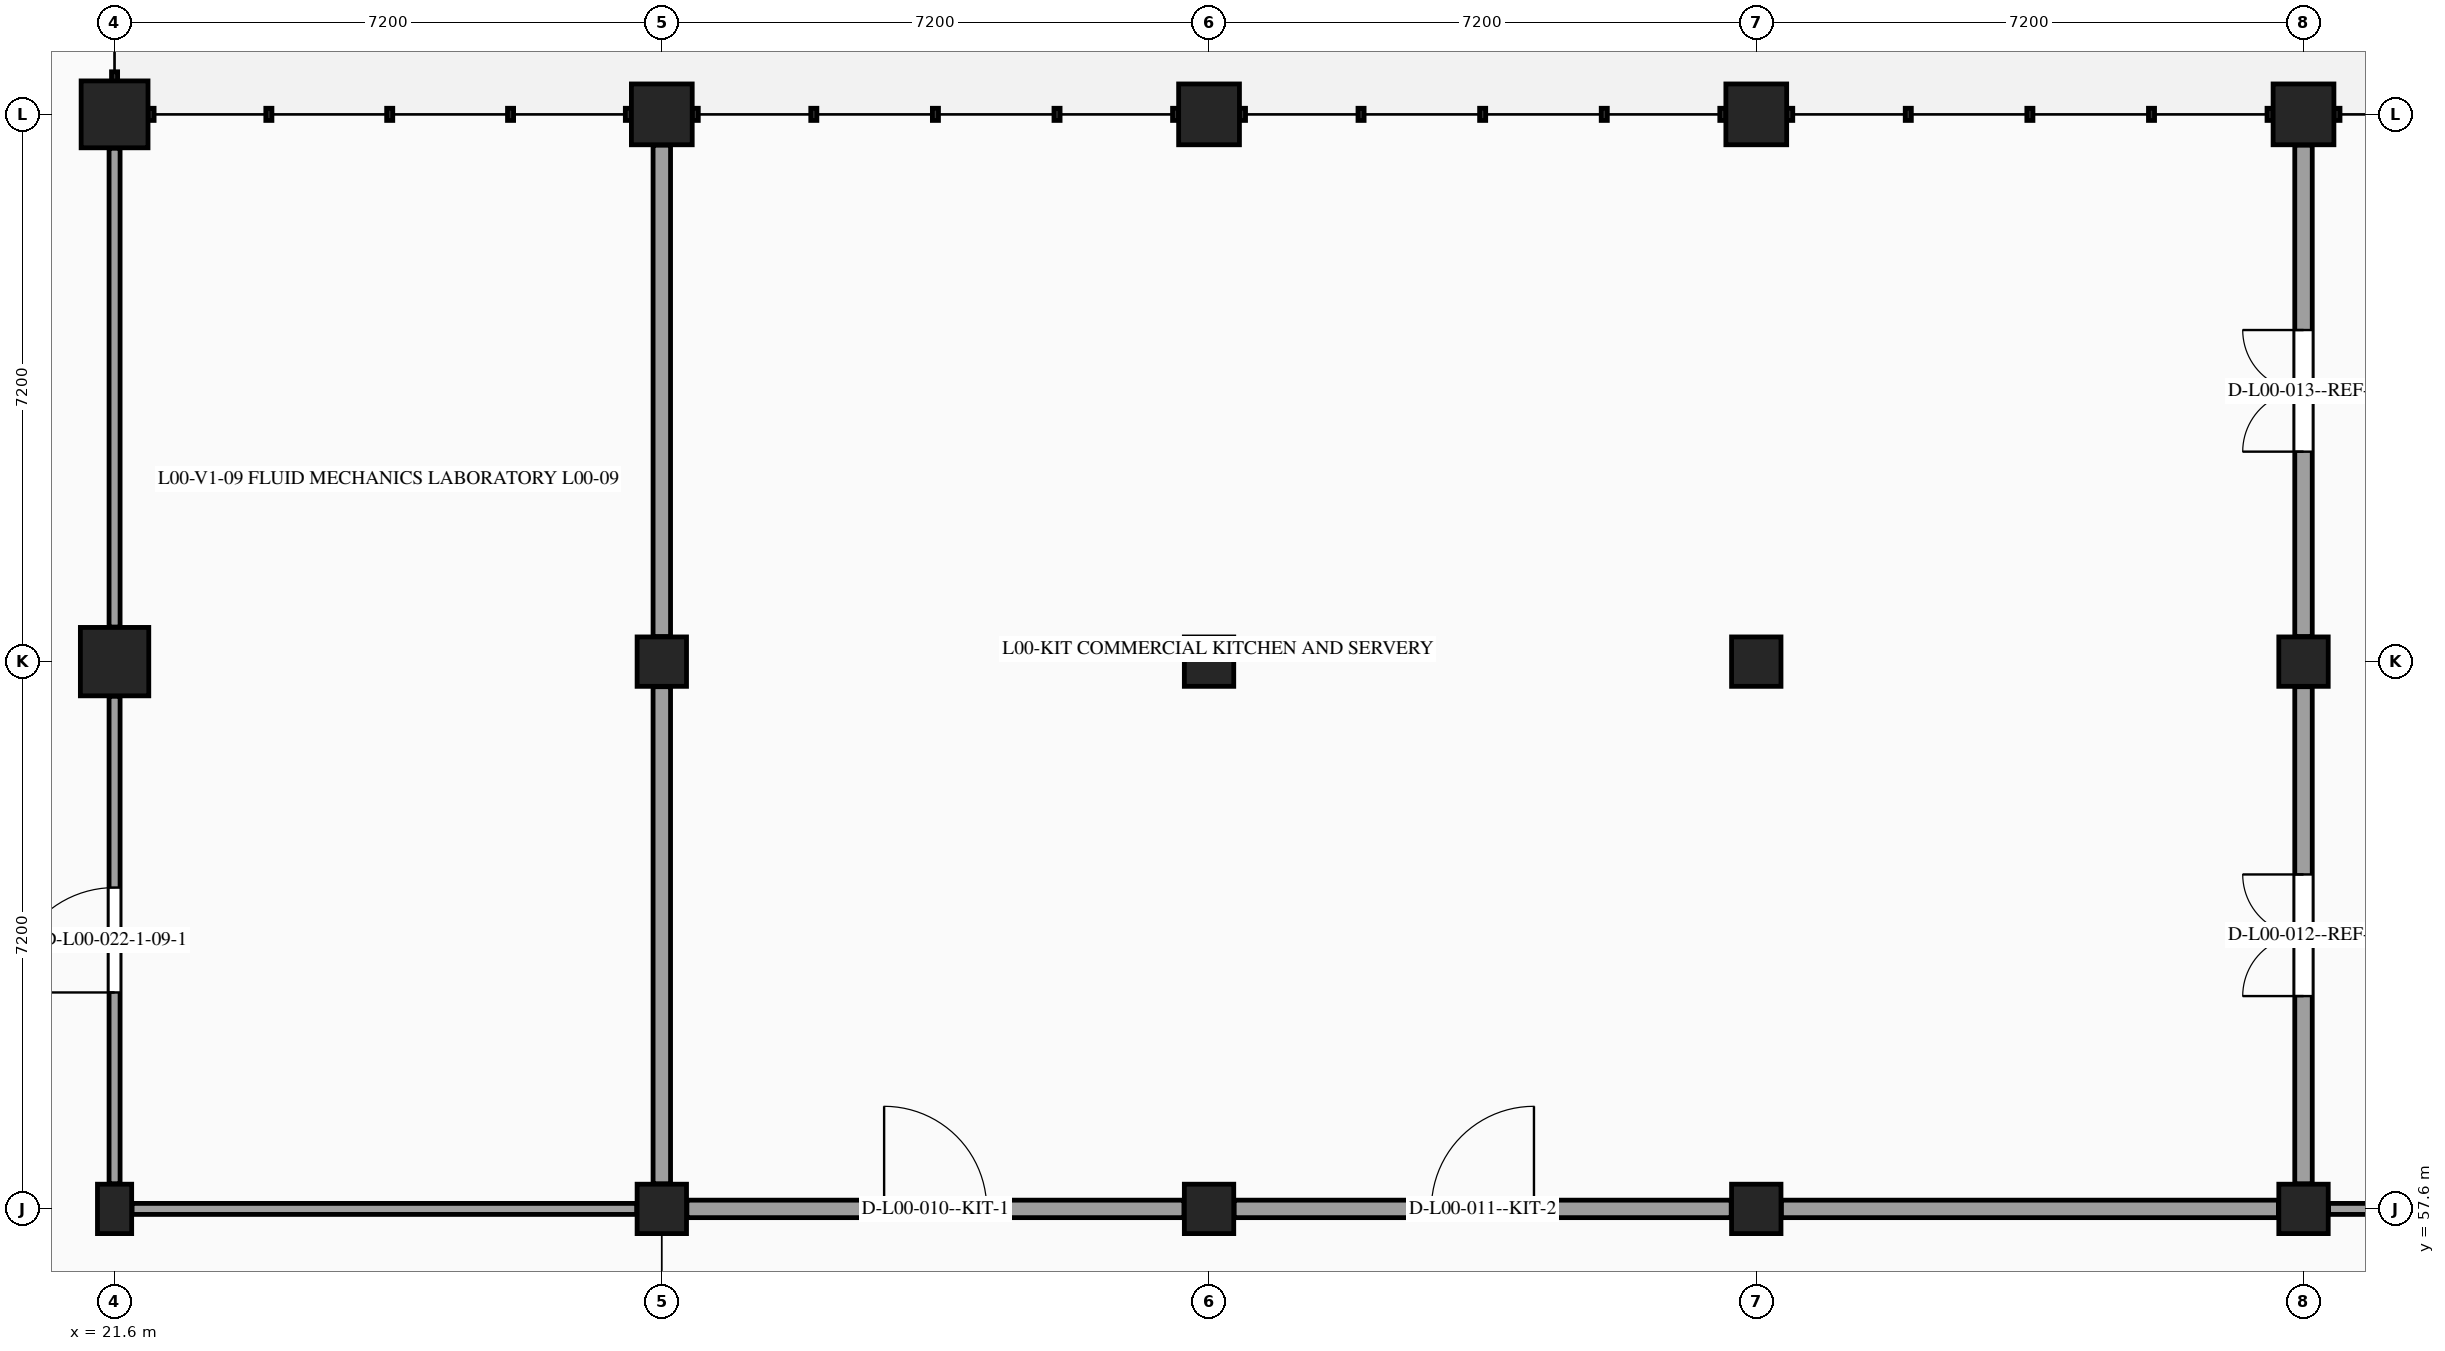
"""IFC4 building model, lengths in metres.
Left out: names, types, materials, properties, quantities, classifications, styles, units other than length and angle.
Written with IfcOpenShell. Run it as: python <this file> out.ifc"""

import sys

from ifc_helpers import new_model, si_unit, direction, frame, frame_2d, origin, origin_2d, place, context, subcontext, project, spatial, rectangle, circle, extrude, element, fill, save


model = new_model("IFC4")
c1 = context("Model", 3, precision=1e-05, world=origin(), true_north=direction((0.0, 1.0)))
c2 = subcontext(c1, "Body", "Model", "MODEL_VIEW")
j1 = project(units=[si_unit("LENGTHUNIT", "METRE"), si_unit("PLANEANGLEUNIT", "RADIAN")], contexts=[c1])
p1 = place(None, origin())
s1 = spatial("IfcSite", under=j1, at=p1, CompositionType="ELEMENT")
p2 = place(p1, origin())
s2 = spatial("IfcBuilding", under=s1, at=p2, CompositionType="ELEMENT")
p3 = place(p2, origin())
s3 = spatial("IfcBuildingStorey", under=s2, at=p3, CompositionType="ELEMENT", Elevation=0.0)
p4 = place(p3, frame((21.6, 57.6, 0.0), z_axis=(0.0, 0.0, 1.0), x_axis=(1.0, 0.0, 0.0)))
e1 = element("IfcColumn", 1, at=p4, inside=s3, PredefinedType="PILASTER", context=c2, shape_type="SweptSolid", body=[
    extrude(rectangle(XDim=0.45, YDim=0.65, at=origin_2d()), origin(), (0.0, 0.0, 1.0), 5.4),
])
p5 = place(p3, frame((21.6, 64.8, 0.0), z_axis=(0.0, 0.0, 1.0), x_axis=(1.0, 0.0, 0.0)))
e2 = element("IfcColumn", 2, at=p5, inside=s3, PredefinedType="COLUMN", context=c2, shape_type="SweptSolid", body=[
    extrude(rectangle(XDim=0.9, YDim=0.9, at=origin_2d()), origin(), (0.0, 0.0, 1.0), 5.4),
])
p6 = place(p3, frame((21.6, 72.0, 0.0), z_axis=(0.0, 0.0, 1.0), x_axis=(1.0, 0.0, 0.0)))
e3 = element("IfcColumn", 3, at=p6, inside=s3, PredefinedType="COLUMN", context=c2, shape_type="SweptSolid", body=[
    extrude(rectangle(XDim=0.88, YDim=0.88, at=origin_2d()), origin(), (0.0, 0.0, 1.0), 5.4),
])
for number, where, z_axis, x_axis in (
    (4, (28.8, 57.6, 0.0), (0.0, 0.0, 1.0), (1.0, 0.0, 0.0)),
    (5, (28.8, 64.8, 0.0), (0.0, 0.0, 1.0), (1.0, 0.0, 0.0)),
):
    element("IfcColumn", number, at=place(p3, frame(where, z_axis=z_axis, x_axis=x_axis)), inside=s3, PredefinedType="COLUMN", context=c2, shape_type="SweptSolid", body=[
        extrude(rectangle(XDim=0.65, YDim=0.65, at=origin_2d()), origin(), (0.0, 0.0, 1.0), 5.4),
    ])
p7 = place(p3, frame((28.8, 72.0, 0.0), z_axis=(0.0, 0.0, 1.0), x_axis=(1.0, 0.0, 0.0)))
e6 = element("IfcColumn", 6, at=p7, inside=s3, PredefinedType="COLUMN", context=c2, shape_type="SweptSolid", body=[
    extrude(circle(Radius=0.4, at=origin_2d()), origin(), (0.0, 0.0, 1.0), 5.4),
])
for number, where, z_axis, x_axis in (
    (7, (36.0, 57.6, 0.0), (0.0, 0.0, 1.0), (1.0, 0.0, 0.0)),
    (8, (36.0, 64.8, 0.0), (0.0, 0.0, 1.0), (1.0, 0.0, 0.0)),
):
    element("IfcColumn", number, at=place(p3, frame(where, z_axis=z_axis, x_axis=x_axis)), inside=s3, PredefinedType="COLUMN", context=c2, shape_type="SweptSolid", body=[
        extrude(rectangle(XDim=0.65, YDim=0.65, at=origin_2d()), origin(), (0.0, 0.0, 1.0), 5.4),
    ])
p8 = place(p3, frame((36.0, 72.0, 0.0), z_axis=(0.0, 0.0, 1.0), x_axis=(1.0, 0.0, 0.0)))
e9 = element("IfcColumn", 9, at=p8, inside=s3, PredefinedType="COLUMN", context=c2, shape_type="SweptSolid", body=[
    extrude(circle(Radius=0.4, at=origin_2d()), origin(), (0.0, 0.0, 1.0), 5.4),
])
for number, where, z_axis, x_axis in (
    (10, (43.2, 57.6, 0.0), (0.0, 0.0, 1.0), (1.0, 0.0, 0.0)),
    (11, (43.2, 64.8, 0.0), (0.0, 0.0, 1.0), (1.0, 0.0, 0.0)),
):
    element("IfcColumn", number, at=place(p3, frame(where, z_axis=z_axis, x_axis=x_axis)), inside=s3, PredefinedType="COLUMN", context=c2, shape_type="SweptSolid", body=[
        extrude(rectangle(XDim=0.65, YDim=0.65, at=origin_2d()), origin(), (0.0, 0.0, 1.0), 5.4),
    ])
p9 = place(p3, frame((43.2, 72.0, 0.0), z_axis=(0.0, 0.0, 1.0), x_axis=(1.0, 0.0, 0.0)))
e12 = element("IfcColumn", 12, at=p9, inside=s3, PredefinedType="COLUMN", context=c2, shape_type="SweptSolid", body=[
    extrude(circle(Radius=0.4, at=origin_2d()), origin(), (0.0, 0.0, 1.0), 5.4),
])
for number, where, z_axis, x_axis in (
    (13, (50.4, 57.6, 0.0), (0.0, 0.0, 1.0), (1.0, 0.0, 0.0)),
    (14, (50.4, 64.8, 0.0), (0.0, 0.0, 1.0), (1.0, 0.0, 0.0)),
):
    element("IfcColumn", number, at=place(p3, frame(where, z_axis=z_axis, x_axis=x_axis)), inside=s3, PredefinedType="COLUMN", context=c2, shape_type="SweptSolid", body=[
        extrude(rectangle(XDim=0.65, YDim=0.65, at=origin_2d()), origin(), (0.0, 0.0, 1.0), 5.4),
    ])
p10 = place(p3, frame((50.4, 72.0, 0.0), z_axis=(0.0, 0.0, 1.0), x_axis=(1.0, 0.0, 0.0)))
e15 = element("IfcColumn", 15, at=p10, inside=s3, PredefinedType="COLUMN", context=c2, shape_type="SweptSolid", body=[
    extrude(circle(Radius=0.4, at=origin_2d()), origin(), (0.0, 0.0, 1.0), 5.4),
])
p11 = place(p3, frame((21.6, 57.93, 0.0), z_axis=(0.0, 0.0, 1.0), x_axis=(0.0, 1.0, 0.0)))
e16 = element("IfcWall", 16, at=p11, inside=s3, PredefinedType="PARTITIONING", context=c2, shape_type="SweptSolid", body=[
    extrude(rectangle(XDim=6.415, YDim=0.145, at=frame_2d((3.208, 0.0))), origin(), (0.0, 0.0, 1.0), 4.405),
])
p12 = place(p11, frame((2.518, 0.0, 0.0)))
e17 = element("IfcOpeningElement", 17, at=p12, cuts=e16, PredefinedType="OPENING", context=c2, shape_type="SweptSolid", body=[
    extrude(rectangle(XDim=1.38, YDim=2.22, at=frame_2d((0.69, 1.11))), frame((0.0, 0.083, 0.0), z_axis=(0.0, -1.0, 0.0), x_axis=(1.0, 0.0, 0.0)), (0.0, 0.0, 1.0), 0.165),
])
p13 = place(p3, frame((21.6, 65.255, 0.0), z_axis=(0.0, 0.0, 1.0), x_axis=(0.0, 1.0, 0.0)))
e18 = element("IfcWall", 18, at=p13, inside=s3, PredefinedType="PARTITIONING", context=c2, shape_type="SweptSolid", body=[
    extrude(rectangle(XDim=6.3, YDim=0.145, at=frame_2d((3.15, 0.0))), origin(), (0.0, 0.0, 1.0), 4.405),
])
p14 = place(p3, frame((21.83, 57.6, 0.0), z_axis=(0.0, 0.0, 1.0), x_axis=(1.0, 0.0, 0.0)))
e19 = element("IfcWall", 19, at=p14, inside=s3, PredefinedType="PARTITIONING", context=c2, shape_type="SweptSolid", body=[
    extrude(rectangle(XDim=6.64, YDim=0.145, at=frame_2d((3.32, 0.0))), origin(), (0.0, 0.0, 1.0), 4.365),
])
p15 = place(p3, frame((28.8, 57.93, 0.0), z_axis=(0.0, 0.0, 1.0), x_axis=(0.0, 1.0, 0.0)))
e20 = element("IfcWall", 20, at=p15, inside=s3, PredefinedType="PARTITIONING", context=c2, shape_type="SweptSolid", body=[
    extrude(rectangle(XDim=6.54, YDim=0.23, at=frame_2d((3.27, 0.0))), origin(), (0.0, 0.0, 1.0), 4.405),
])
p16 = place(p3, frame((28.8, 65.13, 0.0), z_axis=(0.0, 0.0, 1.0), x_axis=(0.0, 1.0, 0.0)))
e21 = element("IfcWall", 21, at=p16, inside=s3, PredefinedType="PARTITIONING", context=c2, shape_type="SweptSolid", body=[
    extrude(rectangle(XDim=6.465, YDim=0.23, at=frame_2d((3.232, 0.0))), origin(), (0.0, 0.0, 1.0), 4.405),
])
p17 = place(p3, frame((29.13, 57.6, 0.0), z_axis=(0.0, 0.0, 1.0), x_axis=(1.0, 0.0, 0.0)))
e22 = element("IfcWall", 22, at=p17, inside=s3, PredefinedType="PARTITIONING", context=c2, shape_type="SweptSolid", body=[
    extrude(rectangle(XDim=6.54, YDim=0.23, at=frame_2d((3.27, 0.0))), origin(), (0.0, 0.0, 1.0), 4.37),
])
p18 = place(p17, frame((2.595, 0.0, 0.0)))
e23 = element("IfcOpeningElement", 23, at=p18, cuts=e22, PredefinedType="OPENING", context=c2, shape_type="SweptSolid", body=[
    extrude(rectangle(XDim=1.35, YDim=2.15, at=frame_2d((0.675, 1.075))), frame((0.0, 0.125, 0.0), z_axis=(0.0, -1.0, 0.0), x_axis=(1.0, 0.0, 0.0)), (0.0, 0.0, 1.0), 0.25),
])
p19 = place(p3, frame((36.33, 57.6, 0.0), z_axis=(0.0, 0.0, 1.0), x_axis=(1.0, 0.0, 0.0)))
e24 = element("IfcWall", 24, at=p19, inside=s3, PredefinedType="PARTITIONING", context=c2, shape_type="SweptSolid", body=[
    extrude(rectangle(XDim=6.54, YDim=0.23, at=frame_2d((3.27, 0.0))), origin(), (0.0, 0.0, 1.0), 4.39),
])
p20 = place(p19, frame((2.595, 0.0, 0.0)))
e25 = element("IfcOpeningElement", 25, at=p20, cuts=e24, PredefinedType="OPENING", context=c2, shape_type="SweptSolid", body=[
    extrude(rectangle(XDim=1.35, YDim=2.15, at=frame_2d((0.675, 1.075))), frame((0.0, 0.125, 0.0), z_axis=(0.0, -1.0, 0.0), x_axis=(1.0, 0.0, 0.0)), (0.0, 0.0, 1.0), 0.25),
])
p21 = place(p3, frame((43.53, 57.6, 0.0), z_axis=(0.0, 0.0, 1.0), x_axis=(1.0, 0.0, 0.0)))
e26 = element("IfcWall", 26, at=p21, inside=s3, PredefinedType="PARTITIONING", context=c2, shape_type="SweptSolid", body=[
    extrude(rectangle(XDim=6.54, YDim=0.23, at=frame_2d((3.27, 0.0))), origin(), (0.0, 0.0, 1.0), 4.43),
])
p22 = place(p3, frame((50.4, 57.93, 0.0), z_axis=(0.0, 0.0, 1.0), x_axis=(0.0, 1.0, 0.0)))
e27 = element("IfcWall", 27, at=p22, inside=s3, PredefinedType="PARTITIONING", context=c2, shape_type="SweptSolid", body=[
    extrude(rectangle(XDim=6.54, YDim=0.23, at=frame_2d((3.27, 0.0))), origin(), (0.0, 0.0, 1.0), 4.405),
])
p23 = place(p22, frame((2.47, 0.0, 0.0)))
e28 = element("IfcOpeningElement", 28, at=p23, cuts=e27, PredefinedType="OPENING", context=c2, shape_type="SweptSolid", body=[
    extrude(rectangle(XDim=1.6, YDim=2.2, at=frame_2d((0.8, 1.1))), frame((0.0, 0.125, 0.0), z_axis=(0.0, -1.0, 0.0), x_axis=(1.0, 0.0, 0.0)), (0.0, 0.0, 1.0), 0.25),
])
p24 = place(p3, frame((50.4, 65.13, 0.0), z_axis=(0.0, 0.0, 1.0), x_axis=(0.0, 1.0, 0.0)))
e29 = element("IfcWall", 29, at=p24, inside=s3, PredefinedType="PARTITIONING", context=c2, shape_type="SweptSolid", body=[
    extrude(rectangle(XDim=6.465, YDim=0.23, at=frame_2d((3.232, 0.0))), origin(), (0.0, 0.0, 1.0), 4.405),
])
p25 = place(p24, frame((2.433, 0.0, 0.0)))
e30 = element("IfcOpeningElement", 30, at=p25, cuts=e29, PredefinedType="OPENING", context=c2, shape_type="SweptSolid", body=[
    extrude(rectangle(XDim=1.6, YDim=2.2, at=frame_2d((0.8, 1.1))), frame((0.0, 0.125, 0.0), z_axis=(0.0, -1.0, 0.0), x_axis=(1.0, 0.0, 0.0)), (0.0, 0.0, 1.0), 0.25),
])
p26 = place(p3, frame((50.73, 57.6, 0.0), z_axis=(0.0, 0.0, 1.0), x_axis=(1.0, 0.0, 0.0)))
e31 = element("IfcWall", 31, at=p26, inside=s3, PredefinedType="PARTITIONING", context=c2, shape_type="SweptSolid", body=[
    extrude(rectangle(XDim=6.75, YDim=0.145, at=frame_2d((3.375, 0.0))), origin(), (0.0, 0.0, 1.0), 5.09),
])
p27 = place(p18, origin())
e32 = element("IfcDoor", 32, at=p27, inside=s3, OperationType="SINGLE_SWING_LEFT", PredefinedType="DOOR", context=c2, shape_type="SweptSolid", body=[
    extrude(rectangle(XDim=1.35, YDim=2.15, at=frame_2d((0.675, 1.075))), frame((0.0, 0.025, 0.0), z_axis=(0.0, -1.0, 0.0), x_axis=(1.0, 0.0, 0.0)), (0.0, 0.0, 1.0), 0.05),
])
fill(e23, e32)
p28 = place(p20, origin())
e33 = element("IfcDoor", 33, at=p28, inside=s3, OperationType="SINGLE_SWING_RIGHT", PredefinedType="DOOR", context=c2, shape_type="SweptSolid", body=[
    extrude(rectangle(XDim=1.35, YDim=2.15, at=frame_2d((0.675, 1.075))), frame((0.0, 0.025, 0.0), z_axis=(0.0, -1.0, 0.0), x_axis=(1.0, 0.0, 0.0)), (0.0, 0.0, 1.0), 0.05),
])
fill(e25, e33)
p29 = place(p23, origin())
e34 = element("IfcDoor", 34, at=p29, inside=s3, OperationType="DOUBLE_DOOR_SINGLE_SWING", PredefinedType="DOOR", context=c2, shape_type="SweptSolid", body=[
    extrude(rectangle(XDim=1.6, YDim=2.2, at=frame_2d((0.8, 1.1))), frame((0.0, 0.025, 0.0), z_axis=(0.0, -1.0, 0.0), x_axis=(1.0, 0.0, 0.0)), (0.0, 0.0, 1.0), 0.05),
])
fill(e28, e34)
p30 = place(p25, origin())
e35 = element("IfcDoor", 35, at=p30, inside=s3, OperationType="DOUBLE_DOOR_SINGLE_SWING", PredefinedType="DOOR", context=c2, shape_type="SweptSolid", body=[
    extrude(rectangle(XDim=1.6, YDim=2.2, at=frame_2d((0.8, 1.1))), frame((0.0, 0.025, 0.0), z_axis=(0.0, -1.0, 0.0), x_axis=(1.0, 0.0, 0.0)), (0.0, 0.0, 1.0), 0.05),
])
fill(e30, e35)
p31 = place(p12, origin())
e36 = element("IfcDoor", 36, at=p31, inside=s3, OperationType="SINGLE_SWING_LEFT", PredefinedType="DOOR", context=c2, shape_type="SweptSolid", body=[
    extrude(rectangle(XDim=1.38, YDim=2.22, at=frame_2d((0.69, 1.11))), frame((0.0, 0.025, 0.0), z_axis=(0.0, -1.0, 0.0), x_axis=(1.0, 0.0, 0.0)), (0.0, 0.0, 1.0), 0.05),
])
fill(e17, e36)
save(model, sys.argv[1])
